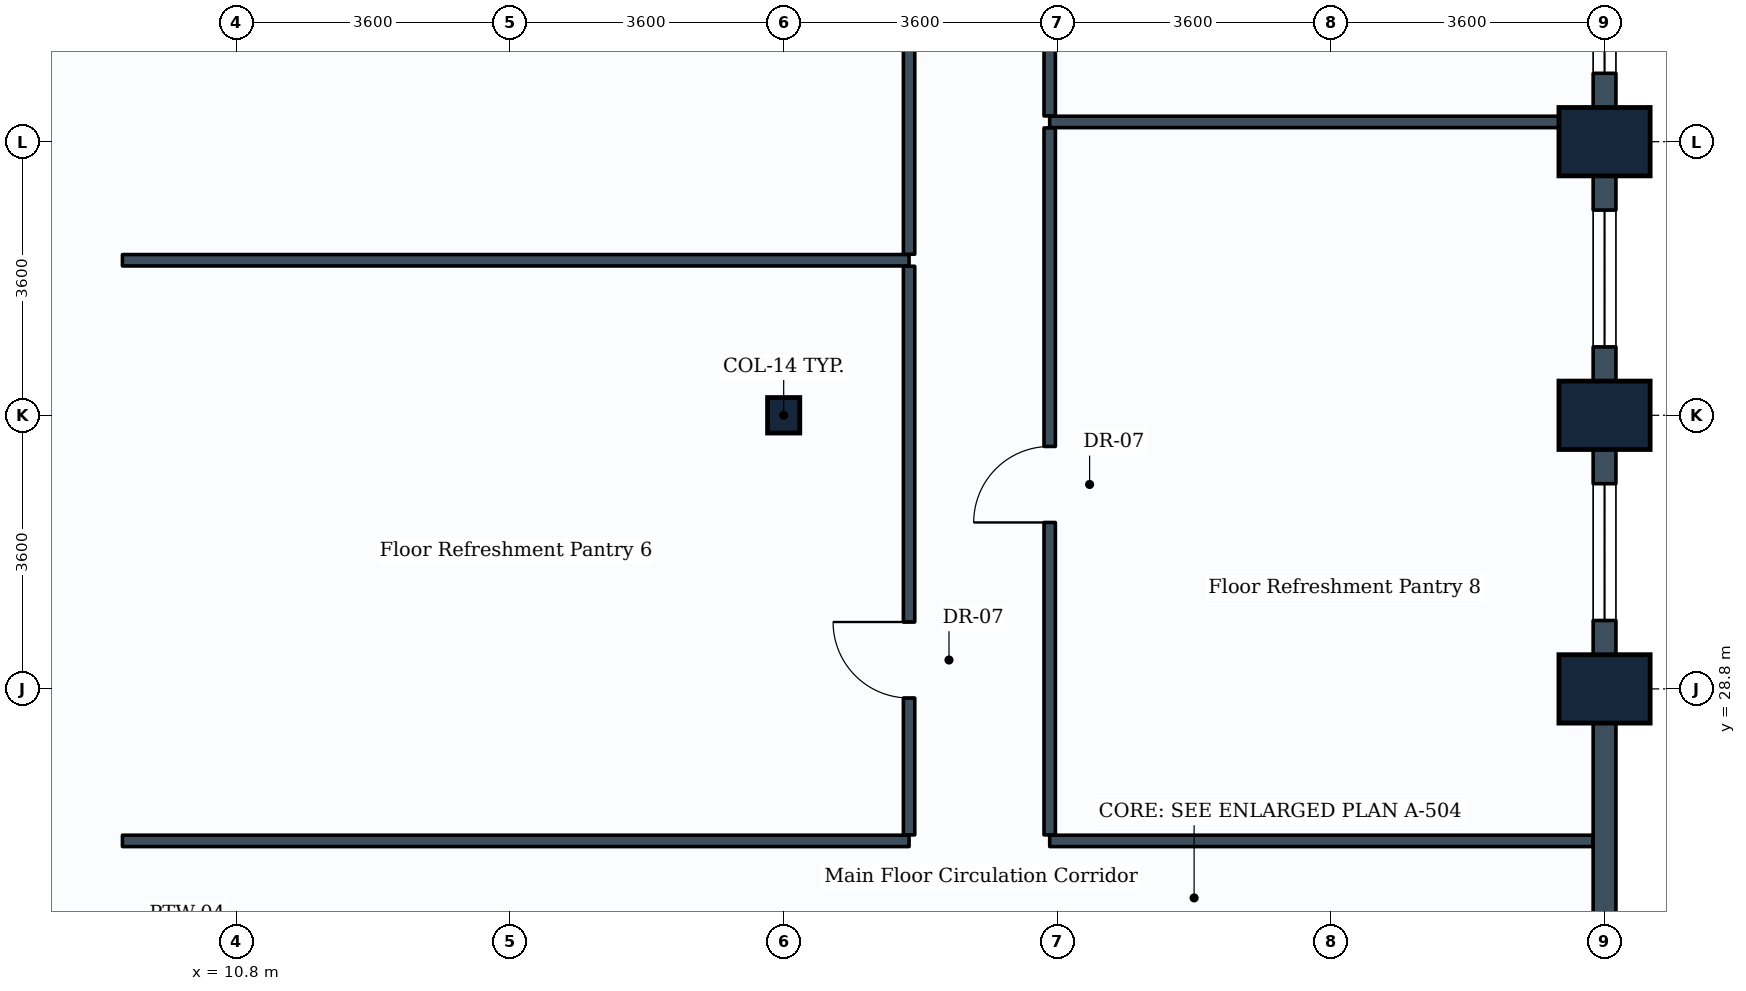
"""IFC4 building model, lengths in metres.
Left out: names, types, materials, properties, quantities, classifications, styles, units other than length and angle.
Written with IfcOpenShell. Run it as: python <this file> out.ifc"""

import sys

from ifc_helpers import new_model, si_unit, direction, frame, frame_2d, origin, origin_2d, place, context, subcontext, project, spatial, rectangle, i_section, extrude, element, fill, save


model = new_model("IFC4")
c1 = context("Model", 3, precision=1e-05, world=origin(), true_north=direction((0.0, 1.0)))
c2 = subcontext(c1, "Body", "Model", "MODEL_VIEW")
j1 = project(units=[si_unit("LENGTHUNIT", "METRE"), si_unit("PLANEANGLEUNIT", "RADIAN")], contexts=[c1])
p1 = place(None, origin())
s1 = spatial("IfcSite", under=j1, at=p1, CompositionType="ELEMENT")
p2 = place(p1, origin())
s2 = spatial("IfcBuilding", under=s1, at=p2, CompositionType="ELEMENT")
p3 = place(p2, frame((0.0, 0.0, 55.2)))
s3 = spatial("IfcBuildingStorey", under=s2, at=p3, CompositionType="ELEMENT", Elevation=55.2)
p4 = place(p3, frame((18.0, 32.4, 0.0), z_axis=(0.0, 0.0, 1.0), x_axis=(1.0, 0.0, 0.0)))
e1 = element("IfcColumn", 1, at=p4, inside=s3, PredefinedType="COLUMN", context=c2, shape_type="SweptSolid", body=[
    extrude(i_section(OverallWidth=0.424, OverallDepth=0.467, WebThickness=0.033, FlangeThickness=0.053, FilletRadius=0.015, at=origin_2d()), origin(), (0.0, 0.0, 1.0), 3.9),
])
for number, where, z_axis, x_axis in (
    (2, (28.8, 28.8, 0.0), (0.0, 0.0, 1.0), (0.0, 1.0, 0.0)),
    (3, (28.8, 32.4, 0.0), (0.0, 0.0, 1.0), (0.0, 1.0, 0.0)),
    (4, (28.8, 36.0, 0.0), (0.0, 0.0, 1.0), (0.0, 1.0, 0.0)),
):
    element("IfcColumn", number, at=place(p3, frame(where, z_axis=z_axis, x_axis=x_axis)), inside=s3, PredefinedType="COLUMN", context=c2, shape_type="SweptSolid", body=[
        extrude(rectangle(XDim=0.9, YDim=1.2, at=origin_2d()), origin(), (0.0, 0.0, 1.0), 3.9),
    ])
p5 = place(p3, frame((28.8, 25.2, 0.0), z_axis=(0.0, 0.0, 1.0), x_axis=(0.0, 1.0, 0.0)))
e5 = element("IfcWall", 5, at=p5, inside=s3, PredefinedType="STANDARD", context=c2, shape_type="SweptSolid", body=[
    extrude(rectangle(XDim=3.6, YDim=0.3, at=frame_2d((1.8, 0.0))), origin(), (0.0, 0.0, 1.0), 3.14),
])
p6 = place(p3, frame((28.8, 28.8, 0.0), z_axis=(0.0, 0.0, 1.0), x_axis=(0.0, 1.0, 0.0)))
e6 = element("IfcWall", 6, at=p6, inside=s3, PredefinedType="STANDARD", context=c2, shape_type="SweptSolid", body=[
    extrude(rectangle(XDim=3.6, YDim=0.3, at=frame_2d((1.8, 0.0))), origin(), (0.0, 0.0, 1.0), 2.93),
])
p7 = place(p6, frame((0.9, 0.0, 0.85)))
e7 = element("IfcOpeningElement", 7, at=p7, cuts=e6, PredefinedType="OPENING", context=c2, shape_type="SweptSolid", body=[
    extrude(rectangle(XDim=1.8, YDim=1.35, at=frame_2d((0.9, 0.675))), frame((0.0, 0.16, 0.0), z_axis=(0.0, -1.0, 0.0), x_axis=(1.0, 0.0, 0.0)), (0.0, 0.0, 1.0), 0.32),
])
p8 = place(p3, frame((28.8, 32.4, 0.0), z_axis=(0.0, 0.0, 1.0), x_axis=(0.0, 1.0, 0.0)))
e8 = element("IfcWall", 8, at=p8, inside=s3, PredefinedType="STANDARD", context=c2, shape_type="SweptSolid", body=[
    extrude(rectangle(XDim=3.6, YDim=0.3, at=frame_2d((1.8, 0.0))), origin(), (0.0, 0.0, 1.0), 2.93),
])
p9 = place(p8, frame((0.9, 0.0, 0.85)))
e9 = element("IfcOpeningElement", 9, at=p9, cuts=e8, PredefinedType="OPENING", context=c2, shape_type="SweptSolid", body=[
    extrude(rectangle(XDim=1.8, YDim=1.35, at=frame_2d((0.9, 0.675))), frame((0.0, 0.16, 0.0), z_axis=(0.0, -1.0, 0.0), x_axis=(1.0, 0.0, 0.0)), (0.0, 0.0, 1.0), 0.32),
])
p10 = place(p3, frame((28.8, 36.0, 0.0), z_axis=(0.0, 0.0, 1.0), x_axis=(0.0, 1.0, 0.0)))
e10 = element("IfcWall", 10, at=p10, inside=s3, PredefinedType="STANDARD", context=c2, shape_type="SweptSolid", body=[
    extrude(rectangle(XDim=3.6, YDim=0.3, at=frame_2d((1.8, 0.0))), origin(), (0.0, 0.0, 1.0), 2.93),
])
p11 = place(p10, frame((0.9, 0.0, 0.85)))
e11 = element("IfcOpeningElement", 11, at=p11, cuts=e10, PredefinedType="OPENING", context=c2, shape_type="SweptSolid", body=[
    extrude(rectangle(XDim=1.8, YDim=1.35, at=frame_2d((0.9, 0.675))), frame((0.0, 0.16, 0.0), z_axis=(0.0, -1.0, 0.0), x_axis=(1.0, 0.0, 0.0)), (0.0, 0.0, 1.0), 0.32),
])
p12 = place(p3, frame((9.3, 26.8, 0.0), z_axis=(0.0, 0.0, 1.0), x_axis=(1.0, 0.0, 0.0)))
e12 = element("IfcWall", 12, at=p12, inside=s3, PredefinedType="PARTITIONING", context=c2, shape_type="SweptSolid", body=[
    extrude(rectangle(XDim=10.35, YDim=0.15, at=frame_2d((5.175, 0.0))), origin(), (0.0, 0.0, 1.0), 3.08),
])
p13 = place(p3, frame((9.3, 34.44, 0.0), z_axis=(0.0, 0.0, 1.0), x_axis=(1.0, 0.0, 0.0)))
e13 = element("IfcWall", 13, at=p13, inside=s3, PredefinedType="PARTITIONING", context=c2, shape_type="SweptSolid", body=[
    extrude(rectangle(XDim=10.35, YDim=0.15, at=frame_2d((5.175, 0.0))), origin(), (0.0, 0.0, 1.0), 3.03),
])
p14 = place(p3, frame((19.65, 26.879, 0.0), z_axis=(0.0, 0.0, 1.0), x_axis=(0.0, 1.0, 0.0)))
e14 = element("IfcWall", 14, at=p14, inside=s3, PredefinedType="PARTITIONING", context=c2, shape_type="SweptSolid", body=[
    extrude(rectangle(XDim=7.482, YDim=0.15, at=frame_2d((3.741, 0.0))), origin(), (0.0, 0.0, 1.0), 3.08),
])
p15 = place(p14, frame((1.801, 0.0, 0.0)))
e15 = element("IfcOpeningElement", 15, at=p15, cuts=e14, PredefinedType="OPENING", context=c2, shape_type="SweptSolid", body=[
    extrude(rectangle(XDim=1.0, YDim=2.1, at=frame_2d((0.5, 1.05))), frame((0.0, 0.085, 0.0), z_axis=(0.0, -1.0, 0.0), x_axis=(1.0, 0.0, 0.0)), (0.0, 0.0, 1.0), 0.17),
])
p16 = place(p3, frame((19.65, 34.519, 0.0), z_axis=(0.0, 0.0, 1.0), x_axis=(0.0, 1.0, 0.0)))
e16 = element("IfcWall", 16, at=p16, inside=s3, PredefinedType="PARTITIONING", context=c2, shape_type="SweptSolid", body=[
    extrude(rectangle(XDim=10.481, YDim=0.15, at=frame_2d((5.24, 0.0))), origin(), (0.0, 0.0, 1.0), 3.08),
])
p17 = place(p16, frame((7.767, 0.0, 0.0)))
e17 = element("IfcOpeningElement", 17, at=p17, cuts=e16, PredefinedType="OPENING", context=c2, shape_type="SweptSolid", body=[
    extrude(rectangle(XDim=1.0, YDim=2.1, at=frame_2d((0.5, 1.05))), frame((0.0, 0.085, 0.0), z_axis=(0.0, -1.0, 0.0), x_axis=(1.0, 0.0, 0.0)), (0.0, 0.0, 1.0), 0.17),
])
p18 = place(p3, frame((21.5, 26.8, 0.0), z_axis=(0.0, 0.0, 1.0), x_axis=(1.0, 0.0, 0.0)))
e18 = element("IfcWall", 18, at=p18, inside=s3, PredefinedType="PARTITIONING", context=c2, shape_type="SweptSolid", body=[
    extrude(rectangle(XDim=7.146, YDim=0.15, at=frame_2d((3.573, 0.0))), origin(), (0.0, 0.0, 1.0), 3.635),
])
p19 = place(p3, frame((21.5, 36.26, 0.0), z_axis=(0.0, 0.0, 1.0), x_axis=(1.0, 0.0, 0.0)))
e19 = element("IfcWall", 19, at=p19, inside=s3, PredefinedType="PARTITIONING", context=c2, shape_type="SweptSolid", body=[
    extrude(rectangle(XDim=7.146, YDim=0.15, at=frame_2d((3.573, 0.0))), origin(), (0.0, 0.0, 1.0), 2.93),
])
p20 = place(p3, frame((21.5, 26.879, 0.0), z_axis=(0.0, 0.0, 1.0), x_axis=(0.0, 1.0, 0.0)))
e20 = element("IfcWall", 20, at=p20, inside=s3, PredefinedType="PARTITIONING", context=c2, shape_type="SweptSolid", body=[
    extrude(rectangle(XDim=9.302, YDim=0.15, at=frame_2d((4.651, 0.0))), origin(), (0.0, 0.0, 1.0), 3.08),
])
p21 = place(p20, frame((4.111, 0.0, 0.0)))
e21 = element("IfcOpeningElement", 21, at=p21, cuts=e20, PredefinedType="OPENING", context=c2, shape_type="SweptSolid", body=[
    extrude(rectangle(XDim=1.0, YDim=2.1, at=frame_2d((0.5, 1.05))), frame((0.0, 0.085, 0.0), z_axis=(0.0, -1.0, 0.0), x_axis=(1.0, 0.0, 0.0)), (0.0, 0.0, 1.0), 0.17),
])
p22 = place(p3, frame((21.5, 36.339, 0.0), z_axis=(0.0, 0.0, 1.0), x_axis=(0.0, 1.0, 0.0)))
e22 = element("IfcWall", 22, at=p22, inside=s3, PredefinedType="PARTITIONING", context=c2, shape_type="SweptSolid", body=[
    extrude(rectangle(XDim=8.661, YDim=0.15, at=frame_2d((4.331, 0.0))), origin(), (0.0, 0.0, 1.0), 3.03),
])
p23 = place(p22, frame((3.791, 0.0, 0.0)))
e23 = element("IfcOpeningElement", 23, at=p23, cuts=e22, PredefinedType="OPENING", context=c2, shape_type="SweptSolid", body=[
    extrude(rectangle(XDim=1.0, YDim=2.1, at=frame_2d((0.5, 1.05))), frame((0.0, 0.085, 0.0), z_axis=(0.0, -1.0, 0.0), x_axis=(1.0, 0.0, 0.0)), (0.0, 0.0, 1.0), 0.17),
])
p24 = place(p7, origin())
e24 = element("IfcWindow", 24, at=p24, inside=s3, PartitioningType="SINGLE_PANEL", PredefinedType="WINDOW", context=c2, shape_type="SweptSolid", body=[
    extrude(rectangle(XDim=1.8, YDim=1.35, at=frame_2d((0.9, 0.675))), frame((0.0, 0.03, 0.0), z_axis=(0.0, -1.0, 0.0), x_axis=(1.0, 0.0, 0.0)), (0.0, 0.0, 1.0), 0.06),
])
fill(e7, e24)
p25 = place(p9, origin())
e25 = element("IfcWindow", 25, at=p25, inside=s3, PartitioningType="SINGLE_PANEL", PredefinedType="WINDOW", context=c2, shape_type="SweptSolid", body=[
    extrude(rectangle(XDim=1.8, YDim=1.35, at=frame_2d((0.9, 0.675))), frame((0.0, 0.03, 0.0), z_axis=(0.0, -1.0, 0.0), x_axis=(1.0, 0.0, 0.0)), (0.0, 0.0, 1.0), 0.06),
])
fill(e9, e25)
p26 = place(p11, origin())
e26 = element("IfcWindow", 26, at=p26, inside=s3, PartitioningType="SINGLE_PANEL", PredefinedType="WINDOW", context=c2, shape_type="SweptSolid", body=[
    extrude(rectangle(XDim=1.8, YDim=1.35, at=frame_2d((0.9, 0.675))), frame((0.0, 0.03, 0.0), z_axis=(0.0, -1.0, 0.0), x_axis=(1.0, 0.0, 0.0)), (0.0, 0.0, 1.0), 0.06),
])
fill(e11, e26)
p27 = place(p15, origin())
e27 = element("IfcDoor", 27, at=p27, inside=s3, OperationType="SINGLE_SWING_RIGHT", PredefinedType="DOOR", context=c2, shape_type="SweptSolid", body=[
    extrude(rectangle(XDim=1.0, YDim=2.1, at=frame_2d((0.5, 1.05))), frame((0.0, 0.025, 0.0), z_axis=(0.0, -1.0, 0.0), x_axis=(1.0, 0.0, 0.0)), (0.0, 0.0, 1.0), 0.05),
])
fill(e15, e27)
p28 = place(p21, origin())
e28 = element("IfcDoor", 28, at=p28, inside=s3, OperationType="SINGLE_SWING_LEFT", PredefinedType="DOOR", context=c2, shape_type="SweptSolid", body=[
    extrude(rectangle(XDim=1.0, YDim=2.1, at=frame_2d((0.5, 1.05))), frame((0.0, 0.025, 0.0), z_axis=(0.0, -1.0, 0.0), x_axis=(1.0, 0.0, 0.0)), (0.0, 0.0, 1.0), 0.05),
])
fill(e21, e28)
save(model, sys.argv[1])
